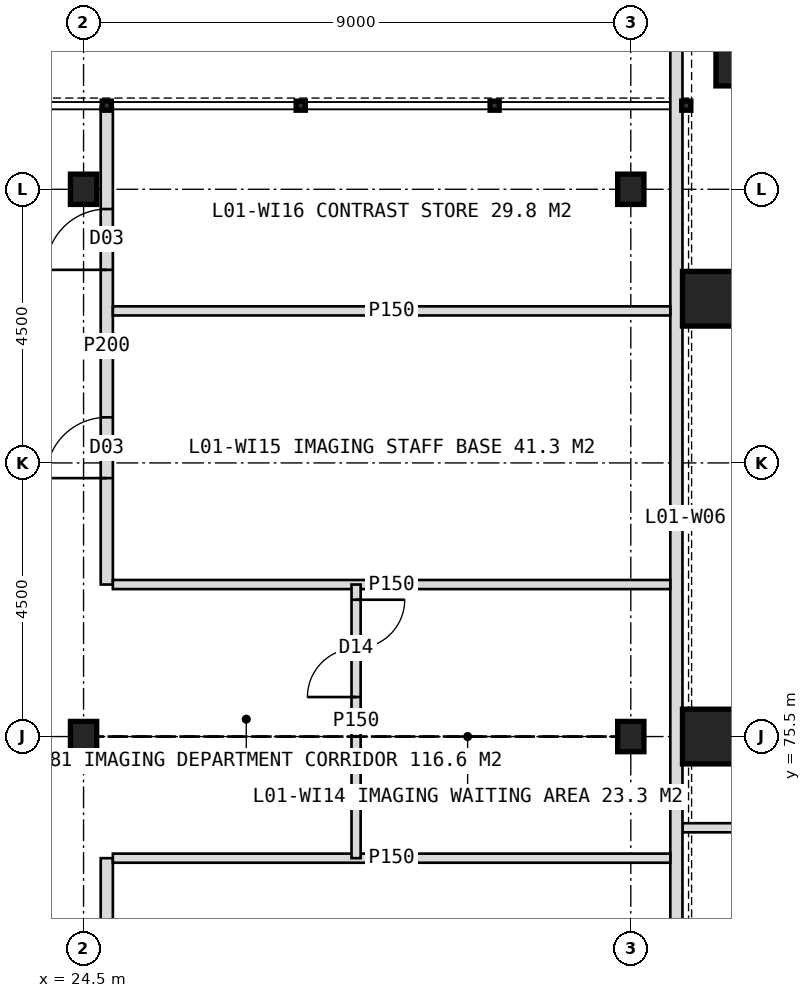
"""IFC4 building model, lengths in metres.
Left out: names, types, materials, properties, quantities, classifications, styles, units other than length and angle.
Written with IfcOpenShell. Run it as: python <this file> out.ifc"""

import sys

from ifc_helpers import new_model, si_unit, direction, frame, frame_2d, origin, origin_2d, place, context, subcontext, project, spatial, rectangle, hollow_rectangle, i_section, extrude, element, fill, save


model = new_model("IFC4")
c1 = context("Model", 3, precision=1e-05, world=origin(), true_north=direction((0.0, 1.0)))
c2 = subcontext(c1, "Body", "Model", "MODEL_VIEW")
j1 = project(units=[si_unit("LENGTHUNIT", "METRE"), si_unit("PLANEANGLEUNIT", "RADIAN")], contexts=[c1])
p1 = place(None, origin())
s1 = spatial("IfcSite", under=j1, at=p1, CompositionType="ELEMENT")
p2 = place(p1, origin())
s2 = spatial("IfcBuilding", under=s1, at=p2, CompositionType="ELEMENT")
p3 = place(p2, frame((0.0, 0.0, 6.0)))
s3 = spatial("IfcBuildingStorey", under=s2, at=p3, CompositionType="ELEMENT", Elevation=6.0)
for number, where, z_axis, x_axis in (
    (1, (34.8, 75.5, 0.0), (0.0, 0.0, 1.0), (1.0, 0.0, 0.0)),
    (2, (34.8, 82.7, 0.0), (0.0, 0.0, 1.0), (1.0, 0.0, 0.0)),
    (3, (35.35, 86.65, 0.0), (0.0, 0.0, 1.0), (1.0, 0.0, 0.0)),
):
    element("IfcColumn", number, at=place(p3, frame(where, z_axis=z_axis, x_axis=x_axis)), inside=s3, PredefinedType="COLUMN", context=c2, shape_type="SweptSolid", body=[
        extrude(hollow_rectangle(XDim=0.9, YDim=0.9, WallThickness=0.08, at=origin_2d()), origin(), (0.0, 0.0, 1.0), 5.0),
    ])
for number, where, z_axis, x_axis in (
    (4, (24.5, 75.5, 0.0), (0.0, 0.0, 1.0), (1.0, 0.0, 0.0)),
    (5, (24.5, 84.5, 0.0), (0.0, 0.0, 1.0), (1.0, 0.0, 0.0)),
    (6, (33.5, 75.5, 0.0), (0.0, 0.0, 1.0), (1.0, 0.0, 0.0)),
    (7, (33.5, 84.5, 0.0), (0.0, 0.0, 1.0), (1.0, 0.0, 0.0)),
):
    element("IfcColumn", number, at=place(p3, frame(where, z_axis=z_axis, x_axis=x_axis)), inside=s3, PredefinedType="COLUMN", context=c2, shape_type="SweptSolid", body=[
        extrude(i_section(OverallWidth=0.432, OverallDepth=0.498, WebThickness=0.056, FlangeThickness=0.089, FilletRadius=0.015, at=origin_2d()), origin(), (0.0, 0.0, 1.0), 5.0),
    ])
p4 = place(p3, frame((40.5, 74.0, 0.0), z_axis=(0.0, 0.0, 1.0), x_axis=(-1.0, 0.0, 0.0)))
e8 = element("IfcWall", 8, at=p4, inside=s3, PredefinedType="PARTITIONING", context=c2, shape_type="SweptSolid", body=[
    extrude(rectangle(XDim=6.15, YDim=0.15, at=frame_2d((3.075, 0.0))), origin(), (0.0, 0.0, 1.0), 4.7),
])
p5 = place(p3, frame((24.882, 64.5, 0.0), z_axis=(0.0, 0.0, 1.0), x_axis=(0.0, 1.0, 0.0)))
e9 = element("IfcWall", 9, at=p5, inside=s3, PredefinedType="PARTITIONING", context=c2, shape_type="SweptSolid", body=[
    extrude(rectangle(XDim=9.0, YDim=0.2, at=frame_2d((4.5, 0.0))), origin(), (0.0, 0.0, 1.0), 4.7),
])
p6 = place(p5, frame((2.45, 0.0, 0.0)))
e10 = element("IfcOpeningElement", 10, at=p6, cuts=e9, PredefinedType="OPENING", context=c2, shape_type="SweptSolid", body=[
    extrude(rectangle(XDim=1.0, YDim=2.1, at=frame_2d((0.5, 1.05))), frame((0.0, 0.11, 0.0), z_axis=(0.0, -1.0, 0.0), x_axis=(1.0, 0.0, 0.0)), (0.0, 0.0, 1.0), 0.22),
])
p7 = place(p5, frame((6.95, 0.0, 0.0)))
e11 = element("IfcOpeningElement", 11, at=p7, cuts=e9, PredefinedType="OPENING", context=c2, shape_type="SweptSolid", body=[
    extrude(rectangle(XDim=1.0, YDim=2.1, at=frame_2d((0.5, 1.05))), frame((0.0, 0.11, 0.0), z_axis=(0.0, -1.0, 0.0), x_axis=(1.0, 0.0, 0.0)), (0.0, 0.0, 1.0), 0.22),
])
p8 = place(p3, frame((24.882, 78.0, 0.0), z_axis=(0.0, 0.0, 1.0), x_axis=(0.0, 1.0, 0.0)))
e12 = element("IfcWall", 12, at=p8, inside=s3, PredefinedType="PARTITIONING", context=c2, shape_type="SweptSolid", body=[
    extrude(rectangle(XDim=7.85, YDim=0.2, at=frame_2d((3.925, 0.0))), origin(), (0.0, 0.0, 1.0), 4.7),
])
p9 = place(p8, frame((1.75, 0.0, 0.0)))
e13 = element("IfcOpeningElement", 13, at=p9, cuts=e12, PredefinedType="OPENING", context=c2, shape_type="SweptSolid", body=[
    extrude(rectangle(XDim=1.0, YDim=2.1, at=frame_2d((0.5, 1.05))), frame((0.0, 0.11, 0.0), z_axis=(0.0, -1.0, 0.0), x_axis=(1.0, 0.0, 0.0)), (0.0, 0.0, 1.0), 0.22),
])
p10 = place(p8, frame((5.175, 0.0, 0.0)))
e14 = element("IfcOpeningElement", 14, at=p10, cuts=e12, PredefinedType="OPENING", context=c2, shape_type="SweptSolid", body=[
    extrude(rectangle(XDim=1.0, YDim=2.1, at=frame_2d((0.5, 1.05))), frame((0.0, 0.11, 0.0), z_axis=(0.0, -1.0, 0.0), x_axis=(1.0, 0.0, 0.0)), (0.0, 0.0, 1.0), 0.22),
])
p11 = place(p3, frame((34.25, 36.8, 0.0), z_axis=(0.0, 0.0, 1.0), x_axis=(0.0, 1.0, 0.0)))
e15 = element("IfcWall", 15, at=p11, inside=s3, PredefinedType="SOLIDWALL", context=c2, shape_type="SweptSolid", body=[
    extrude(rectangle(XDim=50.4, YDim=0.2, at=frame_2d((25.2, 0.0))), origin(), (0.0, 0.0, 1.0), 4.7),
])
p12 = place(p11, frame((6.25, 0.0, 0.0)))
e16 = element("IfcOpeningElement", 16, at=p12, cuts=e15, PredefinedType="OPENING", context=c2, shape_type="SweptSolid", body=[
    extrude(rectangle(XDim=1.8, YDim=2.2, at=frame_2d((0.9, 1.1))), frame((0.0, 0.11, 0.0), z_axis=(0.0, -1.0, 0.0), x_axis=(1.0, 0.0, 0.0)), (0.0, 0.0, 1.0), 0.22),
])
p13 = place(p11, frame((25.55, 0.0, 0.0)))
e17 = element("IfcOpeningElement", 17, at=p13, cuts=e15, PredefinedType="OPENING", context=c2, shape_type="SweptSolid", body=[
    extrude(rectangle(XDim=1.8, YDim=2.2, at=frame_2d((0.9, 1.1))), frame((0.0, 0.11, 0.0), z_axis=(0.0, -1.0, 0.0), x_axis=(1.0, 0.0, 0.0)), (0.0, 0.0, 1.0), 0.22),
])
for number, where, z_axis, x_axis in (
    (18, (24.982, 73.5, 0.0), (0.0, 0.0, 1.0), (1.0, 0.0, 0.0)),
    (19, (24.982, 78.0, 0.0), (0.0, 0.0, 1.0), (1.0, 0.0, 0.0)),
    (20, (24.982, 82.5, 0.0), (0.0, 0.0, 1.0), (1.0, 0.0, 0.0)),
):
    element("IfcWall", number, at=place(p3, frame(where, z_axis=z_axis, x_axis=x_axis)), inside=s3, PredefinedType="PARTITIONING", context=c2, shape_type="SweptSolid", body=[
        extrude(rectangle(XDim=9.168, YDim=0.15, at=frame_2d((4.584, 0.0))), origin(), (0.0, 0.0, 1.0), 4.7),
    ])
p14 = place(p3, frame((28.982, 73.5, 0.0), z_axis=(0.0, 0.0, 1.0), x_axis=(0.0, 1.0, 0.0)))
e21 = element("IfcWall", 21, at=p14, inside=s3, PredefinedType="PARTITIONING", context=c2, shape_type="SweptSolid", body=[
    extrude(rectangle(XDim=4.5, YDim=0.15, at=frame_2d((2.25, 0.0))), origin(), (0.0, 0.0, 1.0), 4.7),
])
p15 = place(p14, frame((2.65, 0.0, 0.0)))
e22 = element("IfcOpeningElement", 22, at=p15, cuts=e21, PredefinedType="OPENING", context=c2, shape_type="SweptSolid", body=[
    extrude(rectangle(XDim=1.6, YDim=2.2, at=frame_2d((0.8, 1.1))), frame((0.0, 0.085, 0.0), z_axis=(0.0, -1.0, 0.0), x_axis=(1.0, 0.0, 0.0)), (0.0, 0.0, 1.0), 0.17),
])
p16 = place(p15, origin())
e23 = element("IfcDoor", 23, at=p16, inside=s3, OperationType="DOUBLE_DOOR_DOUBLE_SWING", PredefinedType="DOOR", context=c2, shape_type="SweptSolid", body=[
    extrude(rectangle(XDim=1.6, YDim=2.2, at=frame_2d((0.8, 1.1))), frame((0.0, 0.025, 0.0), z_axis=(0.0, -1.0, 0.0), x_axis=(1.0, 0.0, 0.0)), (0.0, 0.0, 1.0), 0.05),
])
fill(e22, e23)
p17 = place(p9, origin())
e24 = element("IfcDoor", 24, at=p17, inside=s3, OperationType="SINGLE_SWING_LEFT", PredefinedType="DOOR", context=c2, shape_type="SweptSolid", body=[
    extrude(rectangle(XDim=1.0, YDim=2.1, at=frame_2d((0.5, 1.05))), frame((0.0, 0.025, 0.0), z_axis=(0.0, -1.0, 0.0), x_axis=(1.0, 0.0, 0.0)), (0.0, 0.0, 1.0), 0.05),
])
fill(e13, e24)
p18 = place(p10, origin())
e25 = element("IfcDoor", 25, at=p18, inside=s3, OperationType="SINGLE_SWING_LEFT", PredefinedType="DOOR", context=c2, shape_type="SweptSolid", body=[
    extrude(rectangle(XDim=1.0, YDim=2.1, at=frame_2d((0.5, 1.05))), frame((0.0, 0.025, 0.0), z_axis=(0.0, -1.0, 0.0), x_axis=(1.0, 0.0, 0.0)), (0.0, 0.0, 1.0), 0.05),
])
fill(e14, e25)
save(model, sys.argv[1])
